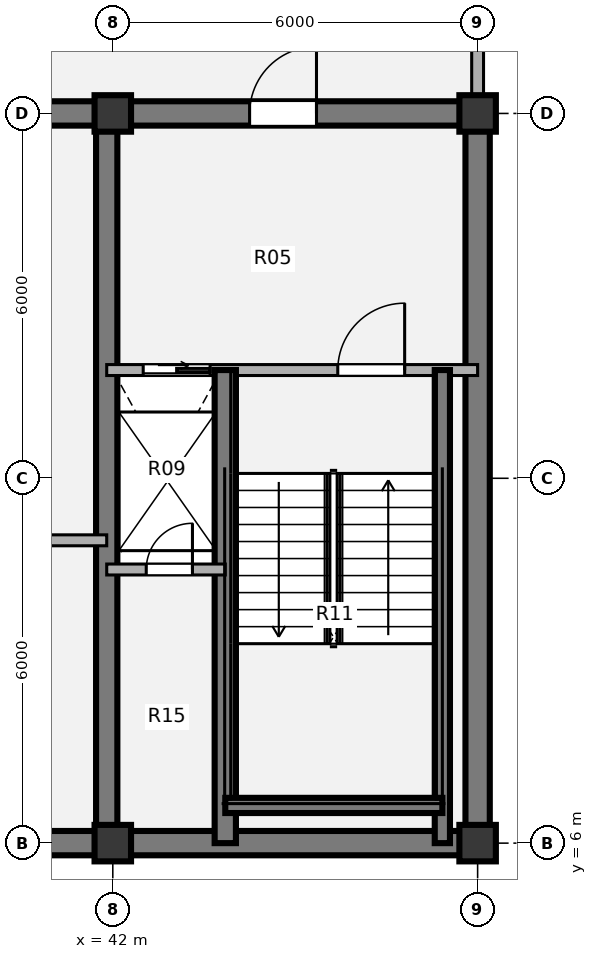
"""IFC4 building model, lengths in metres.
Left out: names, types, materials, properties, quantities, classifications, styles, units other than length and angle.
Written with IfcOpenShell. Run it as: python <this file> out.ifc"""

import sys

from ifc_helpers import new_model, si_unit, direction, frame, frame_2d, origin, origin_2d, place, context, subcontext, project, spatial, rectangle, extrude, source, transform, mapped, element, fill, save


model = new_model("IFC4")
c1 = context("Model", 3, precision=1e-05, world=origin(), true_north=direction((0.0, 1.0)))
c2 = subcontext(c1, "Body", "Model", "MODEL_VIEW")
j1 = project(units=[si_unit("LENGTHUNIT", "METRE"), si_unit("PLANEANGLEUNIT", "RADIAN")], contexts=[c1])
p1 = place(None, origin())
s1 = spatial("IfcSite", under=j1, at=p1, CompositionType="ELEMENT")
p2 = place(p1, origin())
s2 = spatial("IfcBuilding", under=s1, at=p2, CompositionType="ELEMENT")
p3 = place(p2, frame((0.0, 0.0, 295.92)))
s3 = spatial("IfcBuildingStorey", under=s2, at=p3, CompositionType="ELEMENT", Elevation=295.92)
m1 = source(origin(), c2, "Body", "SweptSolid", [
    extrude(rectangle(XDim=0.6, YDim=0.6, at=origin_2d()), origin(), (0.0, 0.0, 1.0), 3.96),
])
for number, where, z_axis, x_axis in (
    (1, (42.0, 6.0, 0.0), (0.0, 0.0, 1.0), (1.0, 0.0, 0.0)),
    (2, (48.0, 6.0, 0.0), (0.0, 0.0, 1.0), (1.0, 0.0, 0.0)),
    (3, (42.0, 18.0, 0.0), (0.0, 0.0, 1.0), (1.0, 0.0, 0.0)),
    (4, (48.0, 18.0, 0.0), (0.0, 0.0, 1.0), (1.0, 0.0, 0.0)),
):
    element("IfcColumn", number, at=place(p3, frame(where, z_axis=z_axis, x_axis=x_axis)), inside=s3, PredefinedType="COLUMN", context=c2, shape_type="MappedRepresentation", body=[
        mapped(m1, transform((0.0, 0.0, 0.0), x_axis=(1.0, 0.0, 0.0), y_axis=(0.0, 1.0, 0.0), z_axis=(0.0, 0.0, 1.0), scale=1.0)),
    ])
p4 = place(p3, frame((48.2, 6.0, 0.0), z_axis=(0.0, 0.0, 1.0), x_axis=(-1.0, 0.0, 0.0)))
e5 = element("IfcWall", 5, at=p4, inside=s3, PredefinedType="SHEAR", context=c2, shape_type="SweptSolid", body=[
    extrude(rectangle(XDim=24.4, YDim=0.4, at=frame_2d((12.2, 0.0))), origin(), (0.0, 0.0, 1.0), 3.96),
])
p5 = place(p3, frame((48.0, 18.0, 0.0), z_axis=(0.0, 0.0, 1.0), x_axis=(0.0, -1.0, 0.0)))
e6 = element("IfcWall", 6, at=p5, inside=s3, PredefinedType="SHEAR", context=c2, shape_type="SweptSolid", body=[
    extrude(rectangle(XDim=12.0, YDim=0.4, at=frame_2d((6.0, 0.0))), origin(), (0.0, 0.0, 1.0), 3.96),
])
p6 = place(p3, frame((38.8, 18.0, 0.0), z_axis=(0.0, 0.0, 1.0), x_axis=(1.0, 0.0, 0.0)))
e7 = element("IfcWall", 7, at=p6, inside=s3, PredefinedType="SHEAR", context=c2, shape_type="SweptSolid", body=[
    extrude(rectangle(XDim=9.4, YDim=0.4, at=frame_2d((4.7, 0.0))), origin(), (0.0, 0.0, 1.0), 3.96),
])
p7 = place(p6, frame((5.45, 0.0, 0.0)))
e8 = element("IfcOpeningElement", 8, at=p7, cuts=e7, PredefinedType="OPENING", context=c2, shape_type="SweptSolid", body=[
    extrude(rectangle(XDim=1.1, YDim=2.1, at=origin_2d()), frame((0.55, 0.21, 1.05), z_axis=(0.0, -1.0, 0.0), x_axis=(1.0, 0.0, 0.0)), (0.0, 0.0, 1.0), 0.42),
])
p8 = place(p3, frame((41.9, 18.0, 0.0), z_axis=(0.0, 0.0, 1.0), x_axis=(0.0, -1.0, 0.0)))
e9 = element("IfcWall", 9, at=p8, inside=s3, PredefinedType="SHEAR", context=c2, shape_type="SweptSolid", body=[
    extrude(rectangle(XDim=12.0, YDim=0.35, at=frame_2d((6.0, 0.0))), origin(), (0.0, 0.0, 1.0), 3.96),
])
p9 = place(p3, frame((48.0, 21.05, 0.0), z_axis=(0.0, 0.0, 1.0), x_axis=(0.0, -1.0, 0.0)))
e10 = element("IfcWall", 10, at=p9, inside=s3, PredefinedType="SOLIDWALL", context=c2, shape_type="SweptSolid", body=[
    extrude(rectangle(XDim=2.77, YDim=0.195, at=frame_2d((1.385, 0.0))), origin(), (0.0, 0.0, 1.0), 2.898),
])
p10 = place(p3, frame((39.35, 10.98, 0.0), z_axis=(0.0, 0.0, 1.0), x_axis=(1.0, 0.0, 0.0)))
e11 = element("IfcWall", 11, at=p10, inside=s3, PredefinedType="PARTITIONING", context=c2, shape_type="SweptSolid", body=[
    extrude(rectangle(XDim=2.55, YDim=0.18, at=frame_2d((1.275, 0.0))), origin(), (0.0, 0.0, 1.0), 3.68),
])
p11 = place(p3, frame((41.9, 13.78, 0.0), z_axis=(0.0, 0.0, 1.0), x_axis=(1.0, 0.0, 0.0)))
e12 = element("IfcWall", 12, at=p11, inside=s3, PredefinedType="PARTITIONING", context=c2, shape_type="SweptSolid", body=[
    extrude(rectangle(XDim=6.1, YDim=0.18, at=frame_2d((3.05, 0.0))), origin(), (0.0, 0.0, 1.0), 3.68),
])
p12 = place(p11, frame((0.6, 0.0, 0.0)))
e13 = element("IfcOpeningElement", 13, at=p12, cuts=e12, PredefinedType="OPENING", context=c2, shape_type="SweptSolid", body=[
    extrude(rectangle(XDim=1.1, YDim=2.1, at=origin_2d()), frame((0.55, 0.1, 1.05), z_axis=(0.0, -1.0, 0.0), x_axis=(1.0, 0.0, 0.0)), (0.0, 0.0, 1.0), 0.2),
])
p13 = place(p11, frame((3.8, 0.0, 0.0)))
e14 = element("IfcOpeningElement", 14, at=p13, cuts=e12, PredefinedType="OPENING", context=c2, shape_type="SweptSolid", body=[
    extrude(rectangle(XDim=1.1, YDim=2.1, at=origin_2d()), frame((0.55, 0.1, 1.05), z_axis=(0.0, -1.0, 0.0), x_axis=(1.0, 0.0, 0.0)), (0.0, 0.0, 1.0), 0.2),
])
p14 = place(p3, frame((43.85, 6.0, 0.0), z_axis=(0.0, 0.0, 1.0), x_axis=(0.0, 1.0, 0.0)))
e15 = element("IfcWall", 15, at=p14, inside=s3, PredefinedType="SHEAR", context=c2, shape_type="SweptSolid", body=[
    extrude(rectangle(XDim=7.78, YDim=0.35, at=frame_2d((3.89, 0.0))), origin(), (0.0, 0.0, 1.0), 4.03),
])
p15 = place(p3, frame((47.42, 6.0, 0.0), z_axis=(0.0, 0.0, 1.0), x_axis=(0.0, 1.0, 0.0)))
e16 = element("IfcWall", 16, at=p15, inside=s3, PredefinedType="SHEAR", context=c2, shape_type="SweptSolid", body=[
    extrude(rectangle(XDim=7.78, YDim=0.25, at=frame_2d((3.89, 0.0))), origin(), (0.0, 0.0, 1.0), 4.03),
])
p16 = place(p3, frame((43.85, 6.62, 0.0), z_axis=(0.0, 0.0, 1.0), x_axis=(1.0, 0.0, 0.0)))
e17 = element("IfcWall", 17, at=p16, inside=s3, PredefinedType="SHEAR", context=c2, shape_type="SweptSolid", body=[
    extrude(rectangle(XDim=3.57, YDim=0.25, at=frame_2d((1.785, 0.0))), origin(), (0.0, 0.0, 1.0), 4.03),
])
p17 = place(p3, frame((41.9, 10.5, 0.0), z_axis=(0.0, 0.0, 1.0), x_axis=(1.0, 0.0, 0.0)))
e18 = element("IfcWall", 18, at=p17, inside=s3, PredefinedType="PARTITIONING", context=c2, shape_type="SweptSolid", body=[
    extrude(rectangle(XDim=1.95, YDim=0.18, at=frame_2d((0.975, 0.0))), origin(), (0.0, 0.0, 1.0), 3.68),
])
p18 = place(p17, frame((0.65, 0.0, 0.0)))
e19 = element("IfcOpeningElement", 19, at=p18, cuts=e18, PredefinedType="OPENING", context=c2, shape_type="SweptSolid", body=[
    extrude(rectangle(XDim=0.76, YDim=2.05, at=origin_2d()), frame((0.38, 0.1, 1.025), z_axis=(0.0, -1.0, 0.0), x_axis=(1.0, 0.0, 0.0)), (0.0, 0.0, 1.0), 0.2),
])
m2 = source(origin(), c2, "Body", "SweptSolid", [
    extrude(rectangle(XDim=1.1, YDim=2.1, at=origin_2d()), frame((0.55, 0.025, 1.05), z_axis=(0.0, -1.0, 0.0), x_axis=(1.0, 0.0, 0.0)), (0.0, 0.0, 1.0), 0.05),
])
p19 = place(p12, origin())
e20 = element("IfcDoor", 20, at=p19, inside=s3, OperationType="SLIDING_TO_RIGHT", PredefinedType="DOOR", context=c2, shape_type="MappedRepresentation", body=[
    mapped(m2, transform((0.0, 0.0, 0.0), x_axis=(1.0, 0.0, 0.0), y_axis=(0.0, 1.0, 0.0), z_axis=(0.0, 0.0, 1.0), scale=1.0)),
])
fill(e13, e20)
m3 = source(origin(), c2, "Body", "SweptSolid", [
    extrude(rectangle(XDim=1.1, YDim=2.1, at=origin_2d()), frame((0.55, 0.025, 1.05), z_axis=(0.0, -1.0, 0.0), x_axis=(1.0, 0.0, 0.0)), (0.0, 0.0, 1.0), 0.05),
])
p20 = place(p13, origin())
e21 = element("IfcDoor", 21, at=p20, inside=s3, OperationType="SINGLE_SWING_RIGHT", PredefinedType="DOOR", context=c2, shape_type="MappedRepresentation", body=[
    mapped(m3, transform((0.0, 0.0, 0.0), x_axis=(1.0, 0.0, 0.0), y_axis=(0.0, 1.0, 0.0), z_axis=(0.0, 0.0, 1.0), scale=1.0)),
])
fill(e14, e21)
m4 = source(origin(), c2, "Body", "SweptSolid", [
    extrude(rectangle(XDim=0.76, YDim=2.05, at=origin_2d()), frame((0.38, 0.025, 1.025), z_axis=(0.0, -1.0, 0.0), x_axis=(1.0, 0.0, 0.0)), (0.0, 0.0, 1.0), 0.05),
])
p21 = place(p18, origin())
e22 = element("IfcDoor", 22, at=p21, inside=s3, OperationType="SINGLE_SWING_RIGHT", PredefinedType="DOOR", context=c2, shape_type="MappedRepresentation", body=[
    mapped(m4, transform((0.0, 0.0, 0.0), x_axis=(1.0, 0.0, 0.0), y_axis=(0.0, 1.0, 0.0), z_axis=(0.0, 0.0, 1.0), scale=1.0)),
])
fill(e19, e22)
m5 = source(origin(), c2, "Body", "SweptSolid", [
    extrude(rectangle(XDim=1.1, YDim=2.1, at=origin_2d()), frame((0.55, 0.025, 1.05), z_axis=(0.0, -1.0, 0.0), x_axis=(1.0, 0.0, 0.0)), (0.0, 0.0, 1.0), 0.05),
])
p22 = place(p7, origin())
e23 = element("IfcDoor", 23, at=p22, inside=s3, OperationType="SINGLE_SWING_RIGHT", PredefinedType="DOOR", context=c2, shape_type="MappedRepresentation", body=[
    mapped(m5, transform((0.0, 0.0, 0.0), x_axis=(1.0, 0.0, 0.0), y_axis=(0.0, 1.0, 0.0), z_axis=(0.0, 0.0, 1.0), scale=1.0)),
])
fill(e8, e23)
save(model, sys.argv[1])
